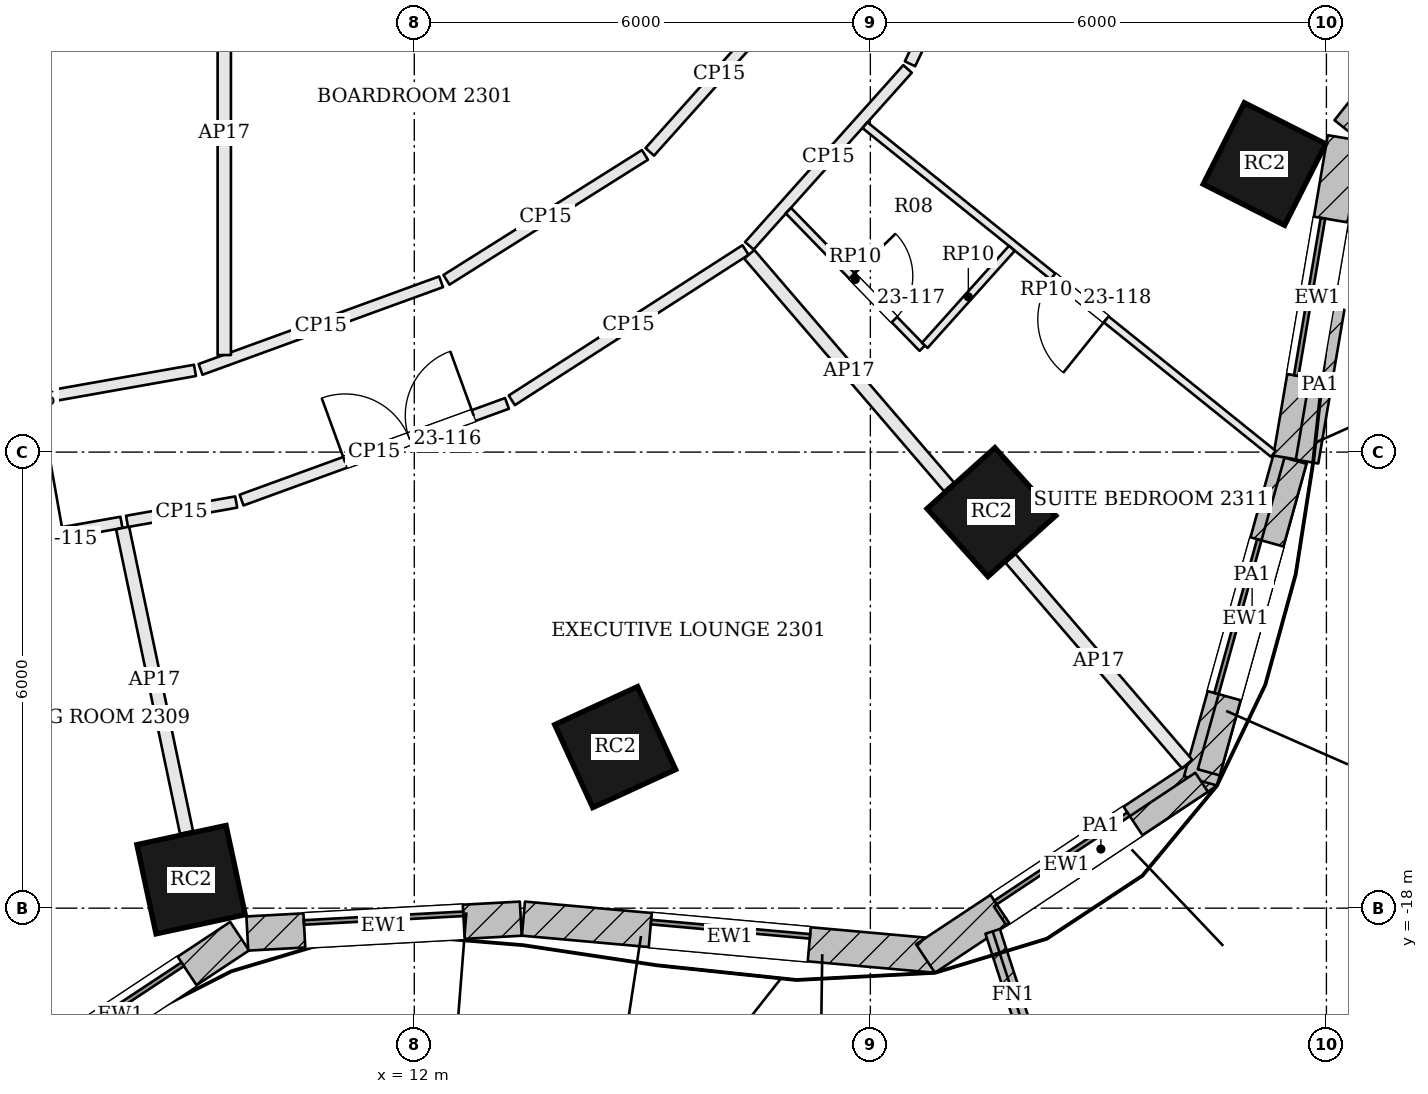
"""IFC4 building model, lengths in metres.
Left out: names, types, materials, properties, quantities, classifications, styles, units other than length and angle.
Written with IfcOpenShell. Run it as: python <this file> out.ifc"""

import sys

from ifc_helpers import new_model, si_unit, direction, frame, frame_2d, origin, origin_2d, place, context, subcontext, project, spatial, rectangle, extrude, element, fill, save


model = new_model("IFC4")
c1 = context("Model", 3, precision=1e-05, world=origin(), true_north=direction((0.0, 1.0)))
c2 = subcontext(c1, "Body", "Model", "MODEL_VIEW")
j1 = project(units=[si_unit("LENGTHUNIT", "METRE"), si_unit("PLANEANGLEUNIT", "RADIAN")], contexts=[c1])
p1 = place(None, origin())
s1 = spatial("IfcSite", under=j1, at=p1, CompositionType="ELEMENT")
p2 = place(p1, origin())
s2 = spatial("IfcBuilding", under=s1, at=p2, CompositionType="ELEMENT")
p3 = place(p2, frame((0.0, 0.0, 99.6)))
s3 = spatial("IfcBuildingStorey", under=s2, at=p3, CompositionType="ELEMENT", Elevation=99.6)
for number, where, z_axis, x_axis in (
    (1, (9.063, -17.625, 0.0), (0.0, 0.0, 1.0), (0.978, 0.21, 0.0)),
    (2, (14.643, -15.881, 0.0), (0.0, 0.0, 1.0), (0.909, 0.417, 0.0)),
    (3, (19.593, -12.79, 0.0), (0.0, 0.0, 1.0), (0.744, 0.668, 0.0)),
    (4, (23.185, -8.21, 0.0), (0.0, 0.0, 1.0), (0.451, 0.893, 0.0)),
):
    element("IfcColumn", number, at=place(p3, frame(where, z_axis=z_axis, x_axis=x_axis)), inside=s3, PredefinedType="COLUMN", context=c2, shape_type="SweptSolid", body=[
        extrude(rectangle(XDim=1.2, YDim=1.2, at=origin_2d()), origin(), (0.0, 0.0, 1.0), 3.6),
    ])
p4 = place(p3, frame((6.568, -20.441, 0.0), z_axis=(0.0, 0.0, 1.0), x_axis=(0.834034214531, 0.551712723246, 0.0)))
e5 = element("IfcWall", 5, at=p4, inside=s3, PredefinedType="SOLIDWALL", context=c2, shape_type="SweptSolid", body=[
    extrude(rectangle(XDim=3.757, YDim=0.45, at=frame_2d((1.879, 0.0))), origin(), (0.0, 0.0, 1.0), 3.4),
])
p5 = place(p4, frame((0.829, 0.0, 0.9)))
e6 = element("IfcOpeningElement", 6, at=p5, cuts=e5, PredefinedType="OPENING", context=c2, shape_type="SweptSolid", body=[
    extrude(rectangle(XDim=2.1, YDim=2.0, at=frame_2d((1.05, 1.0))), frame((0.0, 0.235, 0.0), z_axis=(0.0, -1.0, 0.0), x_axis=(1.0, 0.0, 0.0)), (0.0, 0.0, 1.0), 0.47),
])
p6 = place(p3, frame((9.803, -18.334, 0.0), z_axis=(0.0, 0.0, 1.0), x_axis=(0.998525941495, 0.054276552602, 0.0)))
e7 = element("IfcWall", 7, at=p6, inside=s3, PredefinedType="SOLIDWALL", context=c2, shape_type="SweptSolid", body=[
    extrude(rectangle(XDim=3.603, YDim=0.45, at=frame_2d((1.802, 0.0))), origin(), (0.0, 0.0, 1.0), 3.4),
])
p7 = place(p6, frame((0.751, 0.0, 0.9)))
e8 = element("IfcOpeningElement", 8, at=p7, cuts=e7, PredefinedType="OPENING", context=c2, shape_type="SweptSolid", body=[
    extrude(rectangle(XDim=2.1, YDim=2.0, at=frame_2d((1.05, 1.0))), frame((0.0, 0.235, 0.0), z_axis=(0.0, -1.0, 0.0), x_axis=(1.0, 0.0, 0.0)), (0.0, 0.0, 1.0), 0.47),
])
p8 = place(p3, frame((13.436, -18.138, 0.0), z_axis=(0.0, 0.0, 1.0), x_axis=(0.99598810213, -0.089485755376, 0.0)))
e9 = element("IfcWall", 9, at=p8, inside=s3, PredefinedType="SOLIDWALL", context=c2, shape_type="SweptSolid", body=[
    extrude(rectangle(XDim=5.451, YDim=0.45, at=frame_2d((2.726, 0.0))), origin(), (0.0, 0.0, 1.0), 3.4),
])
p9 = place(p8, frame((1.676, 0.0, 0.9)))
e10 = element("IfcOpeningElement", 10, at=p9, cuts=e9, PredefinedType="OPENING", context=c2, shape_type="SweptSolid", body=[
    extrude(rectangle(XDim=2.1, YDim=2.0, at=frame_2d((1.05, 1.0))), frame((0.0, 0.235, 0.0), z_axis=(0.0, -1.0, 0.0), x_axis=(1.0, 0.0, 0.0)), (0.0, 0.0, 1.0), 0.47),
])
p10 = place(p3, frame((18.726, -18.663, 0.0), z_axis=(0.0, 0.0, 1.0), x_axis=(0.83333921474, 0.552761931736, 0.0)))
e11 = element("IfcWall", 11, at=p10, inside=s3, PredefinedType="SOLIDWALL", context=c2, shape_type="SweptSolid", body=[
    extrude(rectangle(XDim=4.451, YDim=0.45, at=frame_2d((2.225, 0.0))), origin(), (0.0, 0.0, 1.0), 3.4),
])
p11 = place(p10, frame((1.175, 0.0, 0.9)))
e12 = element("IfcOpeningElement", 12, at=p11, cuts=e11, PredefinedType="OPENING", context=c2, shape_type="SweptSolid", body=[
    extrude(rectangle(XDim=2.1, YDim=2.0, at=frame_2d((1.05, 1.0))), frame((0.0, 0.235, 0.0), z_axis=(0.0, -1.0, 0.0), x_axis=(1.0, 0.0, 0.0)), (0.0, 0.0, 1.0), 0.47),
])
p12 = place(p3, frame((22.344, -16.326, 0.0), z_axis=(0.0, 0.0, 1.0), x_axis=(0.267925456304, 0.963439645159, 0.0)))
e13 = element("IfcWall", 13, at=p12, inside=s3, PredefinedType="SOLIDWALL", context=c2, shape_type="SweptSolid", body=[
    extrude(rectangle(XDim=4.427, YDim=0.45, at=frame_2d((2.213, 0.0))), origin(), (0.0, 0.0, 1.0), 3.4),
])
p13 = place(p12, frame((1.164, 0.0, 0.9)))
e14 = element("IfcOpeningElement", 14, at=p13, cuts=e13, PredefinedType="OPENING", context=c2, shape_type="SweptSolid", body=[
    extrude(rectangle(XDim=2.1, YDim=2.0, at=frame_2d((1.05, 1.0))), frame((0.0, 0.235, 0.0), z_axis=(0.0, -1.0, 0.0), x_axis=(1.0, 0.0, 0.0)), (0.0, 0.0, 1.0), 0.47),
])
p14 = place(p3, frame((23.524, -12.083, 0.0), z_axis=(0.0, 0.0, 1.0), x_axis=(0.167445072349, 0.985881406532, 0.0)))
e15 = element("IfcWall", 15, at=p14, inside=s3, PredefinedType="SOLIDWALL", context=c2, shape_type="SweptSolid", body=[
    extrude(rectangle(XDim=4.275, YDim=0.45, at=frame_2d((2.137, 0.0))), origin(), (0.0, 0.0, 1.0), 3.4),
])
p15 = place(p14, frame((1.087, 0.0, 0.9)))
e16 = element("IfcOpeningElement", 16, at=p15, cuts=e15, PredefinedType="OPENING", context=c2, shape_type="SweptSolid", body=[
    extrude(rectangle(XDim=2.1, YDim=2.0, at=frame_2d((1.05, 1.0))), frame((0.0, 0.235, 0.0), z_axis=(0.0, -1.0, 0.0), x_axis=(1.0, 0.0, 0.0)), (0.0, 0.0, 1.0), 0.47),
])
p16 = place(p3, frame((24.282, -7.774, 0.0), z_axis=(0.0, 0.0, 1.0), x_axis=(0.621735490397, 0.783227285008, 0.0)))
e17 = element("IfcWall", 17, at=p16, inside=s3, PredefinedType="SOLIDWALL", context=c2, shape_type="SweptSolid", body=[
    extrude(rectangle(XDim=4.625, YDim=0.45, at=frame_2d((2.312, 0.0))), origin(), (0.0, 0.0, 1.0), 3.4),
])
p17 = place(p16, frame((1.262, 0.0, 0.9)))
e18 = element("IfcOpeningElement", 18, at=p17, cuts=e17, PredefinedType="OPENING", context=c2, shape_type="SweptSolid", body=[
    extrude(rectangle(XDim=2.1, YDim=2.0, at=frame_2d((1.05, 1.0))), frame((0.0, 0.235, 0.0), z_axis=(0.0, -1.0, 0.0), x_axis=(1.0, 0.0, 0.0)), (0.0, 0.0, 1.0), 0.47),
])
p18 = place(p3, frame((19.609, -18.305, 0.0), z_axis=(0.0, 0.0, 1.0), x_axis=(0.308600224758, -0.951191832008, 0.0)))
e19 = element("IfcWall", 19, at=p18, inside=s3, PredefinedType="SOLIDWALL", context=c2, shape_type="SweptSolid", body=[
    extrude(rectangle(XDim=1.75, YDim=0.2, at=frame_2d((0.875, 0.0))), origin(), (0.0, 0.0, 1.0), 3.4),
])
p19 = place(p3, frame((6.665, -20.593, 3.6), z_axis=(0.0, 0.0, 1.0), x_axis=(0.834027642059, 0.551722658843, 0.0)))
e20 = element("IfcWall", 20, at=p19, inside=s3, PredefinedType="PARAPET", context=c2, shape_type="SweptSolid", body=[
    extrude(rectangle(XDim=2.008, YDim=0.3, at=frame_2d((1.004, 0.0))), origin(), (0.0, 0.0, 1.0), 1.1),
])
p20 = place(p3, frame((19.708, -18.101, 3.6), z_axis=(0.0, 0.0, 1.0), x_axis=(0.833370664286, 0.552714515738, 0.0)))
e21 = element("IfcWall", 21, at=p20, inside=s3, PredefinedType="PARAPET", context=c2, shape_type="SweptSolid", body=[
    extrude(rectangle(XDim=3.18, YDim=0.3, at=frame_2d((1.59, 0.0))), origin(), (0.0, 0.0, 1.0), 1.1),
])
p21 = place(p3, frame((22.452, -16.213, 3.6), z_axis=(0.0, 0.0, 1.0), x_axis=(0.267993020858, 0.963420853403, 0.0)))
e22 = element("IfcWall", 22, at=p21, inside=s3, PredefinedType="PARAPET", context=c2, shape_type="SweptSolid", body=[
    extrude(rectangle(XDim=4.255, YDim=0.3, at=frame_2d((2.128, 0.0))), origin(), (0.0, 0.0, 1.0), 1.1),
])
p22 = place(p3, frame((23.745, -12.125, 3.6), z_axis=(0.0, 0.0, 1.0), x_axis=(0.16743218322, 0.985883595574, 0.0)))
e23 = element("IfcWall", 23, at=p22, inside=s3, PredefinedType="PARAPET", context=c2, shape_type="SweptSolid", body=[
    extrude(rectangle(XDim=2.049, YDim=0.3, at=frame_2d((1.024, 0.0))), origin(), (0.0, 0.0, 1.0), 1.1),
])
p23 = place(p3, frame((5.015, -13.48, 0.0), z_axis=(0.0, 0.0, 1.0), x_axis=(0.984640294338, 0.174595219768, 0.0)))
e24 = element("IfcWall", 24, at=p23, inside=s3, PredefinedType="PARTITIONING", context=c2, shape_type="SweptSolid", body=[
    extrude(rectangle(XDim=3.181, YDim=0.15, at=frame_2d((1.591, 0.0))), origin(), (0.0, 0.0, 1.0), 2.784),
])
p24 = place(p23, frame((1.4, 0.0, 0.0)))
e25 = element("IfcOpeningElement", 25, at=p24, cuts=e24, PredefinedType="OPENING", context=c2, shape_type="SweptSolid", body=[
    extrude(rectangle(XDim=1.0, YDim=2.1, at=frame_2d((0.5, 1.05))), frame((0.0, 0.085, 0.0), z_axis=(0.0, -1.0, 0.0), x_axis=(1.0, 0.0, 0.0)), (0.0, 0.0, 1.0), 0.17),
])
p25 = place(p3, frame((9.003, -17.004, 0.0), z_axis=(0.0, 0.0, 1.0), x_axis=(-0.205490383359, 0.978659134912, 0.0)))
e26 = element("IfcWall", 26, at=p25, inside=s3, PredefinedType="PARTITIONING", context=c2, shape_type="SweptSolid", body=[
    extrude(rectangle(XDim=4.093, YDim=0.175, at=frame_2d((2.046, 0.0))), origin(), (0.0, 0.0, 1.0), 2.784),
])
p26 = place(p3, frame((8.221, -12.912, 0.0), z_axis=(0.0, 0.0, 1.0), x_axis=(0.984645082055, 0.174568216995, 0.0)))
e27 = element("IfcWall", 27, at=p26, inside=s3, PredefinedType="PARTITIONING", context=c2, shape_type="SweptSolid", body=[
    extrude(rectangle(XDim=1.459, YDim=0.15, at=frame_2d((0.729, 0.0))), origin(), (0.0, 0.0, 1.0), 2.784),
])
p27 = place(p3, frame((9.728, -12.631, 0.0), z_axis=(0.0, 0.0, 1.0), x_axis=(0.939626438181, 0.342201923826, 0.0)))
e28 = element("IfcWall", 28, at=p27, inside=s3, PredefinedType="PARTITIONING", context=c2, shape_type="SweptSolid", body=[
    extrude(rectangle(XDim=3.716, YDim=0.15, at=frame_2d((1.858, 0.0))), origin(), (0.0, 0.0, 1.0), 2.784),
])
p28 = place(p27, frame((1.45, 0.0, 0.0)))
e29 = element("IfcOpeningElement", 29, at=p28, cuts=e28, PredefinedType="OPENING", context=c2, shape_type="SweptSolid", body=[
    extrude(rectangle(XDim=1.8, YDim=2.1, at=frame_2d((0.9, 1.05))), frame((0.0, 0.085, 0.0), z_axis=(0.0, -1.0, 0.0), x_axis=(1.0, 0.0, 0.0)), (0.0, 0.0, 1.0), 0.17),
])
p29 = place(p3, frame((13.283, -11.319, 0.0), z_axis=(0.0, 0.0, 1.0), x_axis=(0.841150270113, 0.540801463653, 0.0)))
e30 = element("IfcWall", 30, at=p29, inside=s3, PredefinedType="PARTITIONING", context=c2, shape_type="SweptSolid", body=[
    extrude(rectangle(XDim=3.656, YDim=0.15, at=frame_2d((1.828, 0.0))), origin(), (0.0, 0.0, 1.0), 2.784),
])
p30 = place(p3, frame((22.167, -16.104, 0.0), z_axis=(0.0, 0.0, 1.0), x_axis=(-0.651585854712, 0.758574896724, 0.0)))
e31 = element("IfcWall", 31, at=p30, inside=s3, PredefinedType="PARTITIONING", context=c2, shape_type="SweptSolid", body=[
    extrude(rectangle(XDim=3.567, YDim=0.175, at=frame_2d((1.783, 0.0))), origin(), (0.0, 0.0, 1.0), 2.784),
])
p31 = place(p3, frame((19.035, -12.458, 0.0), z_axis=(0.0, 0.0, 1.0), x_axis=(-0.651603524635, 0.7585597186, 0.0)))
e32 = element("IfcWall", 32, at=p31, inside=s3, PredefinedType="PARTITIONING", context=c2, shape_type="SweptSolid", body=[
    extrude(rectangle(XDim=4.033, YDim=0.175, at=frame_2d((2.017, 0.0))), origin(), (0.0, 0.0, 1.0), 2.784),
])
p32 = place(p3, frame((16.408, -9.285, 0.0), z_axis=(0.0, 0.0, 1.0), x_axis=(0.666792573149, 0.745243359174, 0.0)))
e33 = element("IfcWall", 33, at=p32, inside=s3, PredefinedType="PARTITIONING", context=c2, shape_type="SweptSolid", body=[
    extrude(rectangle(XDim=3.121, YDim=0.15, at=frame_2d((1.561, 0.0))), origin(), (0.0, 0.0, 1.0), 2.784),
])
p33 = place(p3, frame((18.522, -6.891, 0.0), z_axis=(0.0, 0.0, 1.0), x_axis=(0.428157819028, 0.903703979191, 0.0)))
e34 = element("IfcWall", 34, at=p33, inside=s3, PredefinedType="PARTITIONING", context=c2, shape_type="SweptSolid", body=[
    extrude(rectangle(XDim=2.349, YDim=0.15, at=frame_2d((1.175, 0.0))), origin(), (0.0, 0.0, 1.0), 2.784),
])
p34 = place(p3, frame((16.925, -6.009, 0.0), z_axis=(0.0, 0.0, 1.0), x_axis=(-0.666893859891, -0.745152722359, 0.0)))
e35 = element("IfcWall", 35, at=p34, inside=s3, PredefinedType="PARTITIONING", context=c2, shape_type="SweptSolid", body=[
    extrude(rectangle(XDim=2.739, YDim=0.15, at=frame_2d((1.37, 0.0))), origin(), (0.0, 0.0, 1.0), 2.784),
])
p35 = place(p3, frame((15.034, -8.09, 0.0), z_axis=(0.0, 0.0, 1.0), x_axis=(-0.846322679414, -0.532670557014, 0.0)))
e36 = element("IfcWall", 36, at=p35, inside=s3, PredefinedType="PARTITIONING", context=c2, shape_type="SweptSolid", body=[
    extrude(rectangle(XDim=3.085, YDim=0.15, at=frame_2d((1.543, 0.0))), origin(), (0.0, 0.0, 1.0), 2.784),
])
p36 = place(p3, frame((12.353, -9.76, 0.0), z_axis=(0.0, 0.0, 1.0), x_axis=(-0.939632450309, -0.342185415127, 0.0)))
e37 = element("IfcWall", 37, at=p36, inside=s3, PredefinedType="PARTITIONING", context=c2, shape_type="SweptSolid", body=[
    extrude(rectangle(XDim=3.368, YDim=0.15, at=frame_2d((1.684, 0.0))), origin(), (0.0, 0.0, 1.0), 2.784),
])
p37 = place(p3, frame((9.115, -10.925, 0.0), z_axis=(0.0, 0.0, 1.0), x_axis=(-0.984632605417, -0.174638576352, 0.0)))
e38 = element("IfcWall", 38, at=p37, inside=s3, PredefinedType="PARTITIONING", context=c2, shape_type="SweptSolid", body=[
    extrude(rectangle(XDim=4.423, YDim=0.15, at=frame_2d((2.211, 0.0))), origin(), (0.0, 0.0, 1.0), 2.784),
])
p38 = place(p3, frame((23.302, -12.023, 0.0), z_axis=(0.0, 0.0, 1.0), x_axis=(-0.779049211338, 0.626962779049, 0.0)))
e39 = element("IfcWall", 39, at=p38, inside=s3, PredefinedType="PARTITIONING", context=c2, shape_type="SweptSolid", body=[
    extrude(rectangle(XDim=6.898, YDim=0.1, at=frame_2d((3.449, 0.0))), origin(), (0.0, 0.0, 1.0), 2.784),
])
p39 = place(p38, frame((2.823, 0.0, 0.0)))
e40 = element("IfcOpeningElement", 40, at=p39, cuts=e39, PredefinedType="OPENING", context=c2, shape_type="SweptSolid", body=[
    extrude(rectangle(XDim=0.9, YDim=2.4, at=frame_2d((0.45, 1.2))), frame((0.0, 0.06, 0.0), z_axis=(0.0, -1.0, 0.0), x_axis=(1.0, 0.0, 0.0)), (0.0, 0.0, 1.0), 0.12),
])
p40 = place(p3, frame((16.922, -8.823, 0.0), z_axis=(0.0, 0.0, 1.0), x_axis=(0.697371069569, -0.71671025619, 0.0)))
e41 = element("IfcWall", 41, at=p40, inside=s3, PredefinedType="PARTITIONING", context=c2, shape_type="SweptSolid", body=[
    extrude(rectangle(XDim=2.525, YDim=0.1, at=frame_2d((1.262, 0.0))), origin(), (0.0, 0.0, 1.0), 2.784),
])
p41 = place(p40, frame((1.2, 0.0, 0.0)))
e42 = element("IfcOpeningElement", 42, at=p41, cuts=e41, PredefinedType="OPENING", context=c2, shape_type="SweptSolid", body=[
    extrude(rectangle(XDim=0.8, YDim=2.1, at=frame_2d((0.4, 1.05))), frame((0.0, 0.06, 0.0), z_axis=(0.0, -1.0, 0.0), x_axis=(1.0, 0.0, 0.0)), (0.0, 0.0, 1.0), 0.12),
])
p42 = place(p3, frame((18.716, -10.596, 0.0), z_axis=(0.0, 0.0, 1.0), x_axis=(0.667863253754, 0.744284001094, 0.0)))
e43 = element("IfcWall", 43, at=p42, inside=s3, PredefinedType="PARTITIONING", context=c2, shape_type="SweptSolid", body=[
    extrude(rectangle(XDim=1.716, YDim=0.1, at=frame_2d((0.858, 0.0))), origin(), (0.0, 0.0, 1.0), 2.784),
])
p43 = place(p3, frame((9.5, -10.723, 0.0), z_axis=(0.0, 0.0, 1.0), x_axis=(0.0, 1.0, 0.0)))
e44 = element("IfcWall", 44, at=p43, inside=s3, PredefinedType="PARTITIONING", context=c2, shape_type="SweptSolid", body=[
    extrude(rectangle(XDim=5.848, YDim=0.175, at=frame_2d((2.924, 0.0))), origin(), (0.0, 0.0, 1.0), 2.784),
])
p44 = place(p5, origin())
e45 = element("IfcWindow", 45, at=p44, inside=s3, PartitioningType="SINGLE_PANEL", PredefinedType="WINDOW", context=c2, shape_type="SweptSolid", body=[
    extrude(rectangle(XDim=2.1, YDim=2.0, at=frame_2d((1.05, 1.0))), frame((0.0, 0.135, 0.0), z_axis=(0.0, -1.0, 0.0), x_axis=(1.0, 0.0, 0.0)), (0.0, 0.0, 1.0), 0.06),
])
fill(e6, e45)
p45 = place(p7, origin())
e46 = element("IfcWindow", 46, at=p45, inside=s3, PartitioningType="SINGLE_PANEL", PredefinedType="WINDOW", context=c2, shape_type="SweptSolid", body=[
    extrude(rectangle(XDim=2.1, YDim=2.0, at=frame_2d((1.05, 1.0))), frame((0.0, 0.135, 0.0), z_axis=(0.0, -1.0, 0.0), x_axis=(1.0, 0.0, 0.0)), (0.0, 0.0, 1.0), 0.06),
])
fill(e8, e46)
p46 = place(p9, origin())
e47 = element("IfcWindow", 47, at=p46, inside=s3, PartitioningType="SINGLE_PANEL", PredefinedType="WINDOW", context=c2, shape_type="SweptSolid", body=[
    extrude(rectangle(XDim=2.1, YDim=2.0, at=frame_2d((1.05, 1.0))), frame((0.0, 0.135, 0.0), z_axis=(0.0, -1.0, 0.0), x_axis=(1.0, 0.0, 0.0)), (0.0, 0.0, 1.0), 0.06),
])
fill(e10, e47)
p47 = place(p11, origin())
e48 = element("IfcWindow", 48, at=p47, inside=s3, PartitioningType="SINGLE_PANEL", PredefinedType="WINDOW", context=c2, shape_type="SweptSolid", body=[
    extrude(rectangle(XDim=2.1, YDim=2.0, at=frame_2d((1.05, 1.0))), frame((0.0, 0.135, 0.0), z_axis=(0.0, -1.0, 0.0), x_axis=(1.0, 0.0, 0.0)), (0.0, 0.0, 1.0), 0.06),
])
fill(e12, e48)
p48 = place(p13, origin())
e49 = element("IfcWindow", 49, at=p48, inside=s3, PartitioningType="SINGLE_PANEL", PredefinedType="WINDOW", context=c2, shape_type="SweptSolid", body=[
    extrude(rectangle(XDim=2.1, YDim=2.0, at=frame_2d((1.05, 1.0))), frame((0.0, 0.135, 0.0), z_axis=(0.0, -1.0, 0.0), x_axis=(1.0, 0.0, 0.0)), (0.0, 0.0, 1.0), 0.06),
])
fill(e14, e49)
p49 = place(p15, origin())
e50 = element("IfcWindow", 50, at=p49, inside=s3, PartitioningType="SINGLE_PANEL", PredefinedType="WINDOW", context=c2, shape_type="SweptSolid", body=[
    extrude(rectangle(XDim=2.1, YDim=2.0, at=frame_2d((1.05, 1.0))), frame((0.0, 0.135, 0.0), z_axis=(0.0, -1.0, 0.0), x_axis=(1.0, 0.0, 0.0)), (0.0, 0.0, 1.0), 0.06),
])
fill(e16, e50)
p50 = place(p24, origin())
e51 = element("IfcDoor", 51, at=p50, inside=s3, OperationType="SINGLE_SWING_RIGHT", PredefinedType="DOOR", context=c2, shape_type="SweptSolid", body=[
    extrude(rectangle(XDim=1.0, YDim=2.1, at=frame_2d((0.5, 1.05))), frame((0.0, 0.025, 0.0), z_axis=(0.0, -1.0, 0.0), x_axis=(1.0, 0.0, 0.0)), (0.0, 0.0, 1.0), 0.05),
])
fill(e25, e51)
p51 = place(p28, origin())
e52 = element("IfcDoor", 52, at=p51, inside=s3, OperationType="DOUBLE_DOOR_SINGLE_SWING", PredefinedType="DOOR", context=c2, shape_type="SweptSolid", body=[
    extrude(rectangle(XDim=1.8, YDim=2.1, at=frame_2d((0.9, 1.05))), frame((0.0, 0.025, 0.0), z_axis=(0.0, -1.0, 0.0), x_axis=(1.0, 0.0, 0.0)), (0.0, 0.0, 1.0), 0.05),
])
fill(e29, e52)
p52 = place(p41, origin())
e53 = element("IfcDoor", 53, at=p52, inside=s3, OperationType="SINGLE_SWING_LEFT", PredefinedType="DOOR", context=c2, shape_type="SweptSolid", body=[
    extrude(rectangle(XDim=0.8, YDim=2.1, at=frame_2d((0.4, 1.05))), frame((0.0, 0.025, 0.0), z_axis=(0.0, -1.0, 0.0), x_axis=(1.0, 0.0, 0.0)), (0.0, 0.0, 1.0), 0.05),
])
fill(e42, e53)
p53 = place(p39, origin())
e54 = element("IfcDoor", 54, at=p53, inside=s3, OperationType="SINGLE_SWING_LEFT", PredefinedType="DOOR", context=c2, shape_type="SweptSolid", body=[
    extrude(rectangle(XDim=0.9, YDim=2.4, at=frame_2d((0.45, 1.2))), frame((0.0, 0.025, 0.0), z_axis=(0.0, -1.0, 0.0), x_axis=(1.0, 0.0, 0.0)), (0.0, 0.0, 1.0), 0.05),
])
fill(e40, e54)
save(model, sys.argv[1])
